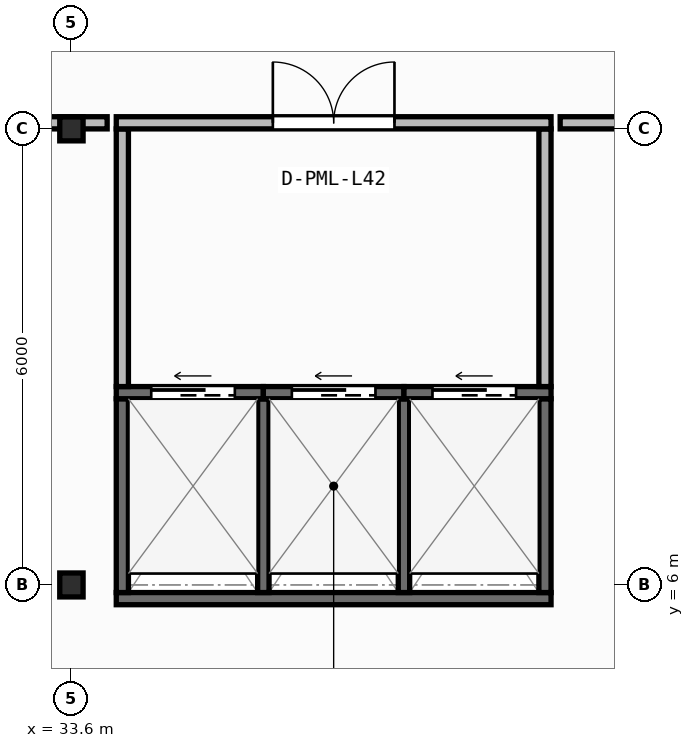
"""IFC4 building model, lengths in metres.
Left out: names, types, materials, properties, quantities, classifications, styles, units other than length and angle.
Written with IfcOpenShell. Run it as: python <this file> out.ifc"""

import sys

from ifc_helpers import new_model, si_unit, direction, frame, frame_2d, origin, origin_2d, place, context, subcontext, project, spatial, rectangle, i_section, extrude, element, fill, save


model = new_model("IFC4")
c1 = context("Model", 3, precision=1e-05, world=origin(), true_north=direction((0.0, 1.0)))
c2 = subcontext(c1, "Body", "Model", "MODEL_VIEW")
j1 = project(units=[si_unit("LENGTHUNIT", "METRE"), si_unit("PLANEANGLEUNIT", "RADIAN")], contexts=[c1])
p1 = place(None, origin())
s1 = spatial("IfcSite", under=j1, at=p1, CompositionType="ELEMENT")
p2 = place(p1, origin())
s2 = spatial("IfcBuilding", under=s1, at=p2, CompositionType="ELEMENT")
p3 = place(p2, frame((0.0, 0.0, 170.5)))
s3 = spatial("IfcBuildingStorey", under=s2, at=p3, CompositionType="ELEMENT", Elevation=170.5)
for number, where, z_axis, x_axis in (
    (1, (33.6, 6.0, 0.0), (0.0, 0.0, 1.0), (1.0, 0.0, 0.0)),
    (2, (33.6, 12.0, 0.0), (0.0, 0.0, 1.0), (1.0, 0.0, 0.0)),
):
    element("IfcColumn", number, at=place(p3, frame(where, z_axis=z_axis, x_axis=x_axis)), inside=s3, PredefinedType="COLUMN", context=c2, shape_type="SweptSolid", body=[
        extrude(i_section(OverallWidth=0.307, OverallDepth=0.315, WebThickness=0.012, FlangeThickness=0.019, FilletRadius=0.017, at=origin_2d()), origin(), (0.0, 0.0, 1.0), 3.95),
    ])
p4 = place(p3, frame((34.19, 5.82, 0.0), z_axis=(0.0, 0.0, 1.0), x_axis=(1.0, 0.0, 0.0)))
e3 = element("IfcWall", 3, at=p4, inside=s3, PredefinedType="SHEAR", context=c2, shape_type="SweptSolid", body=[
    extrude(rectangle(XDim=5.72, YDim=0.16, at=frame_2d((2.86, 0.0))), origin(), (0.0, 0.0, 1.0), 3.67),
])
for number, where, z_axis, x_axis in (
    (4, (34.27, 5.9, 0.0), (0.0, 0.0, 1.0), (0.0, 1.0, 0.0)),
    (5, (39.83, 5.9, 0.0), (0.0, 0.0, 1.0), (0.0, 1.0, 0.0)),
):
    element("IfcWall", number, at=place(p3, frame(where, z_axis=z_axis, x_axis=x_axis)), inside=s3, PredefinedType="SHEAR", context=c2, shape_type="SweptSolid", body=[
        extrude(rectangle(XDim=2.55, YDim=0.16, at=frame_2d((1.275, 0.0))), origin(), (0.0, 0.0, 1.0), 3.67),
    ])
for number, where, z_axis, x_axis in (
    (6, (36.125, 5.9, 0.0), (0.0, 0.0, 1.0), (0.0, 1.0, 0.0)),
    (7, (37.975, 5.9, 0.0), (0.0, 0.0, 1.0), (0.0, 1.0, 0.0)),
):
    element("IfcWall", number, at=place(p3, frame(where, z_axis=z_axis, x_axis=x_axis)), inside=s3, PredefinedType="SHEAR", context=c2, shape_type="SweptSolid", body=[
        extrude(rectangle(XDim=2.55, YDim=0.15, at=frame_2d((1.275, 0.0))), origin(), (0.0, 0.0, 1.0), 3.67),
    ])
p5 = place(p3, frame((34.19, 8.53, 0.0), z_axis=(0.0, 0.0, 1.0), x_axis=(1.0, 0.0, 0.0)))
e8 = element("IfcWall", 8, at=p5, inside=s3, PredefinedType="SHEAR", context=c2, shape_type="SweptSolid", body=[
    extrude(rectangle(XDim=1.935, YDim=0.16, at=frame_2d((0.968, 0.0))), origin(), (0.0, 0.0, 1.0), 3.67),
])
p6 = place(p5, frame((0.46, 0.0, 0.0)))
e9 = element("IfcOpeningElement", 9, at=p6, cuts=e8, PredefinedType="OPENING", context=c2, shape_type="SweptSolid", body=[
    extrude(rectangle(XDim=1.1, YDim=2.15, at=frame_2d((0.55, 1.075))), frame((0.0, 0.09, 0.0), z_axis=(0.0, -1.0, 0.0), x_axis=(1.0, 0.0, 0.0)), (0.0, 0.0, 1.0), 0.18),
])
p7 = place(p3, frame((36.125, 8.53, 0.0), z_axis=(0.0, 0.0, 1.0), x_axis=(1.0, 0.0, 0.0)))
e10 = element("IfcWall", 10, at=p7, inside=s3, PredefinedType="SHEAR", context=c2, shape_type="SweptSolid", body=[
    extrude(rectangle(XDim=1.85, YDim=0.16, at=frame_2d((0.925, 0.0))), origin(), (0.0, 0.0, 1.0), 3.67),
])
p8 = place(p7, frame((0.375, 0.0, 0.0)))
e11 = element("IfcOpeningElement", 11, at=p8, cuts=e10, PredefinedType="OPENING", context=c2, shape_type="SweptSolid", body=[
    extrude(rectangle(XDim=1.1, YDim=2.15, at=frame_2d((0.55, 1.075))), frame((0.0, 0.09, 0.0), z_axis=(0.0, -1.0, 0.0), x_axis=(1.0, 0.0, 0.0)), (0.0, 0.0, 1.0), 0.18),
])
p9 = place(p3, frame((37.975, 8.53, 0.0), z_axis=(0.0, 0.0, 1.0), x_axis=(1.0, 0.0, 0.0)))
e12 = element("IfcWall", 12, at=p9, inside=s3, PredefinedType="SHEAR", context=c2, shape_type="SweptSolid", body=[
    extrude(rectangle(XDim=1.935, YDim=0.16, at=frame_2d((0.967, 0.0))), origin(), (0.0, 0.0, 1.0), 3.67),
])
p10 = place(p9, frame((0.375, 0.0, 0.0)))
e13 = element("IfcOpeningElement", 13, at=p10, cuts=e12, PredefinedType="OPENING", context=c2, shape_type="SweptSolid", body=[
    extrude(rectangle(XDim=1.1, YDim=2.15, at=frame_2d((0.55, 1.075))), frame((0.0, 0.09, 0.0), z_axis=(0.0, -1.0, 0.0), x_axis=(1.0, 0.0, 0.0)), (0.0, 0.0, 1.0), 0.18),
])
for number, where, z_axis, x_axis in (
    (14, (34.27, 8.61, 0.0), (0.0, 0.0, 1.0), (0.0, 1.0, 0.0)),
    (15, (39.83, 8.61, 0.0), (0.0, 0.0, 1.0), (0.0, 1.0, 0.0)),
):
    element("IfcWall", number, at=place(p3, frame(where, z_axis=z_axis, x_axis=x_axis)), inside=s3, PredefinedType="PARTITIONING", context=c2, shape_type="SweptSolid", body=[
        extrude(rectangle(XDim=3.39, YDim=0.16, at=frame_2d((1.695, 0.0))), origin(), (0.0, 0.0, 1.0), 3.67),
    ])
p11 = place(p3, frame((34.19, 12.08, 0.0), z_axis=(0.0, 0.0, 1.0), x_axis=(1.0, 0.0, 0.0)))
e16 = element("IfcWall", 16, at=p11, inside=s3, PredefinedType="PARTITIONING", context=c2, shape_type="SweptSolid", body=[
    extrude(rectangle(XDim=5.72, YDim=0.16, at=frame_2d((2.86, 0.0))), origin(), (0.0, 0.0, 1.0), 3.043),
])
p12 = place(p11, frame((2.06, 0.0, 0.0)))
e17 = element("IfcOpeningElement", 17, at=p12, cuts=e16, PredefinedType="OPENING", context=c2, shape_type="SweptSolid", body=[
    extrude(rectangle(XDim=1.6, YDim=2.05, at=frame_2d((0.8, 1.025))), frame((0.0, 0.09, 0.0), z_axis=(0.0, -1.0, 0.0), x_axis=(1.0, 0.0, 0.0)), (0.0, 0.0, 1.0), 0.18),
])
p13 = place(p3, frame((31.439, 12.08, 0.0), z_axis=(0.0, 0.0, 1.0), x_axis=(1.0, 0.0, 0.0)))
e18 = element("IfcWall", 18, at=p13, inside=s3, PredefinedType="PARTITIONING", context=c2, shape_type="SweptSolid", body=[
    extrude(rectangle(XDim=2.631, YDim=0.16, at=frame_2d((1.315, 0.0))), origin(), (0.0, 0.0, 1.0), 3.043),
])
p14 = place(p3, frame((40.03, 12.08, 0.0), z_axis=(0.0, 0.0, 1.0), x_axis=(1.0, 0.0, 0.0)))
e19 = element("IfcWall", 19, at=p14, inside=s3, PredefinedType="PARTITIONING", context=c2, shape_type="SweptSolid", body=[
    extrude(rectangle(XDim=2.781, YDim=0.16, at=frame_2d((1.39, 0.0))), origin(), (0.0, 0.0, 1.0), 3.043),
])
p15 = place(p6, origin())
e20 = element("IfcDoor", 20, at=p15, inside=s3, OperationType="SLIDING_TO_LEFT", PredefinedType="DOOR", context=c2, shape_type="SweptSolid", body=[
    extrude(rectangle(XDim=1.1, YDim=2.15, at=frame_2d((0.55, 1.075))), frame((0.0, 0.025, 0.0), z_axis=(0.0, -1.0, 0.0), x_axis=(1.0, 0.0, 0.0)), (0.0, 0.0, 1.0), 0.05),
])
fill(e9, e20)
p16 = place(p8, origin())
e21 = element("IfcDoor", 21, at=p16, inside=s3, OperationType="SLIDING_TO_LEFT", PredefinedType="DOOR", context=c2, shape_type="SweptSolid", body=[
    extrude(rectangle(XDim=1.1, YDim=2.15, at=frame_2d((0.55, 1.075))), frame((0.0, 0.025, 0.0), z_axis=(0.0, -1.0, 0.0), x_axis=(1.0, 0.0, 0.0)), (0.0, 0.0, 1.0), 0.05),
])
fill(e11, e21)
p17 = place(p10, origin())
e22 = element("IfcDoor", 22, at=p17, inside=s3, OperationType="SLIDING_TO_LEFT", PredefinedType="DOOR", context=c2, shape_type="SweptSolid", body=[
    extrude(rectangle(XDim=1.1, YDim=2.15, at=frame_2d((0.55, 1.075))), frame((0.0, 0.025, 0.0), z_axis=(0.0, -1.0, 0.0), x_axis=(1.0, 0.0, 0.0)), (0.0, 0.0, 1.0), 0.05),
])
fill(e13, e22)
p18 = place(p12, origin())
e23 = element("IfcDoor", 23, at=p18, inside=s3, OperationType="DOUBLE_DOOR_SINGLE_SWING", PredefinedType="DOOR", context=c2, shape_type="SweptSolid", body=[
    extrude(rectangle(XDim=1.6, YDim=2.05, at=frame_2d((0.8, 1.025))), frame((0.0, 0.025, 0.0), z_axis=(0.0, -1.0, 0.0), x_axis=(1.0, 0.0, 0.0)), (0.0, 0.0, 1.0), 0.05),
])
fill(e17, e23)
save(model, sys.argv[1])
